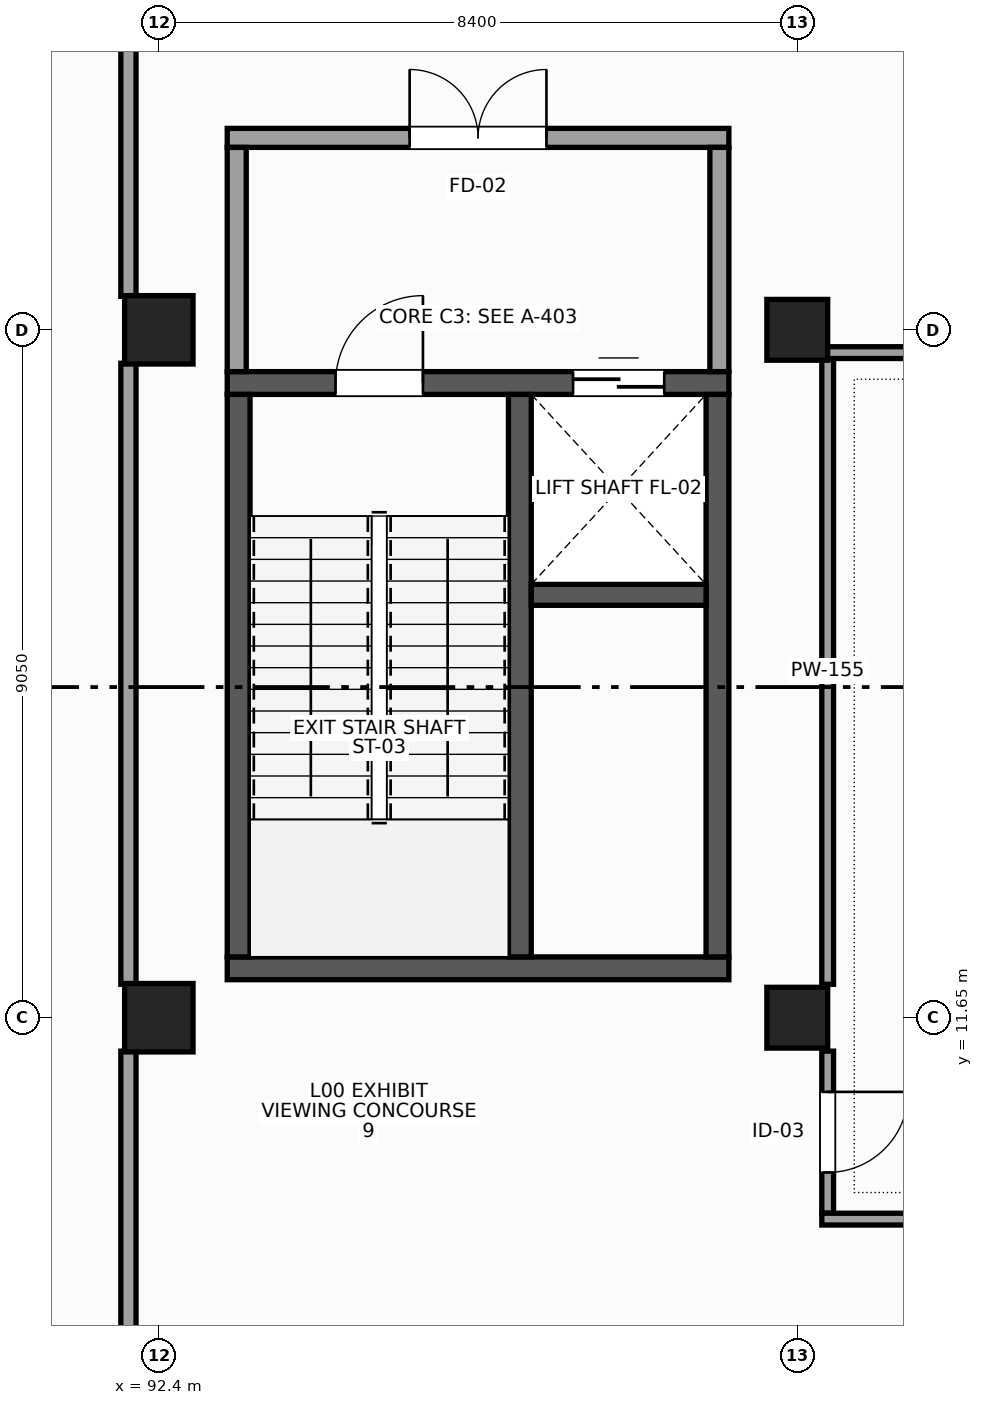
"""IFC4 building model, lengths in metres.
Left out: names, types, materials, properties, quantities, classifications, styles, units other than length and angle.
Written with IfcOpenShell. Run it as: python <this file> out.ifc"""

import sys

from ifc_helpers import new_model, si_unit, direction, frame, frame_2d, origin, origin_2d, place, context, subcontext, project, spatial, rectangle, extrude, element, fill, save


model = new_model("IFC4")
c1 = context("Model", 3, precision=1e-05, world=origin(), true_north=direction((0.0, 1.0)))
c2 = subcontext(c1, "Body", "Model", "MODEL_VIEW")
j1 = project(units=[si_unit("LENGTHUNIT", "METRE"), si_unit("PLANEANGLEUNIT", "RADIAN")], contexts=[c1])
p1 = place(None, origin())
s1 = spatial("IfcSite", under=j1, at=p1, CompositionType="ELEMENT")
p2 = place(p1, origin())
s2 = spatial("IfcBuilding", under=s1, at=p2, CompositionType="ELEMENT")
p3 = place(p2, origin())
s3 = spatial("IfcBuildingStorey", under=s2, at=p3, CompositionType="ELEMENT", Elevation=0.0)
for number, where, z_axis, x_axis in (
    (1, (92.4, 11.65, 0.0), (0.0, 0.0, 1.0), (1.0, 0.0, 0.0)),
    (2, (92.4, 20.7, 0.0), (0.0, 0.0, 1.0), (1.0, 0.0, 0.0)),
):
    element("IfcColumn", number, at=place(p3, frame(where, z_axis=z_axis, x_axis=x_axis)), inside=s3, PredefinedType="COLUMN", context=c2, shape_type="SweptSolid", body=[
        extrude(rectangle(XDim=0.9, YDim=0.9, at=origin_2d()), origin(), (0.0, 0.0, 1.0), 5.4),
    ])
for number, where, z_axis, x_axis in (
    (3, (100.8, 11.65, 0.0), (0.0, 0.0, 1.0), (1.0, 0.0, 0.0)),
    (4, (100.8, 20.7, 0.0), (0.0, 0.0, 1.0), (1.0, 0.0, 0.0)),
):
    element("IfcColumn", number, at=place(p3, frame(where, z_axis=z_axis, x_axis=x_axis)), inside=s3, PredefinedType="COLUMN", context=c2, shape_type="SweptSolid", body=[
        extrude(rectangle(XDim=0.8, YDim=0.8, at=origin_2d()), origin(), (0.0, 0.0, 1.0), 5.4),
    ])
p4 = place(p3, frame((93.3, 12.3, 0.0), z_axis=(0.0, 0.0, 1.0), x_axis=(1.0, 0.0, 0.0)))
e5 = element("IfcWall", 5, at=p4, inside=s3, PredefinedType="SHEAR", context=c2, shape_type="SweptSolid", body=[
    extrude(rectangle(XDim=6.6, YDim=0.3, at=frame_2d((3.3, 0.0))), origin(), (0.0, 0.0, 1.0), 5.09),
])
p5 = place(p3, frame((93.3, 20.0, 0.0), z_axis=(0.0, 0.0, 1.0), x_axis=(1.0, 0.0, 0.0)))
e6 = element("IfcWall", 6, at=p5, inside=s3, PredefinedType="SHEAR", context=c2, shape_type="SweptSolid", body=[
    extrude(rectangle(XDim=6.6, YDim=0.3, at=frame_2d((3.3, 0.0))), origin(), (0.0, 0.0, 1.0), 5.09),
])
p6 = place(p5, frame((1.425, 0.0, 0.0)))
e7 = element("IfcOpeningElement", 7, at=p6, cuts=e6, PredefinedType="OPENING", context=c2, shape_type="SweptSolid", body=[
    extrude(rectangle(XDim=1.15, YDim=2.2, at=frame_2d((0.575, 1.1))), frame((0.0, 0.16, 0.0), z_axis=(0.0, -1.0, 0.0), x_axis=(1.0, 0.0, 0.0)), (0.0, 0.0, 1.0), 0.32),
])
p7 = place(p5, frame((4.55, 0.0, 0.0)))
e8 = element("IfcOpeningElement", 8, at=p7, cuts=e6, PredefinedType="OPENING", context=c2, shape_type="SweptSolid", body=[
    extrude(rectangle(XDim=1.2, YDim=2.15, at=frame_2d((0.6, 1.075))), frame((0.0, 0.16, 0.0), z_axis=(0.0, -1.0, 0.0), x_axis=(1.0, 0.0, 0.0)), (0.0, 0.0, 1.0), 0.32),
])
for number, where, z_axis, x_axis in (
    (9, (93.45, 12.45, 0.0), (0.0, 0.0, 1.0), (0.0, 1.0, 0.0)),
    (10, (99.75, 12.45, 0.0), (0.0, 0.0, 1.0), (0.0, 1.0, 0.0)),
    (11, (97.15, 12.45, 0.0), (0.0, 0.0, 1.0), (0.0, 1.0, 0.0)),
):
    element("IfcWall", number, at=place(p3, frame(where, z_axis=z_axis, x_axis=x_axis)), inside=s3, PredefinedType="SHEAR", context=c2, shape_type="SweptSolid", body=[
        extrude(rectangle(XDim=7.4, YDim=0.3, at=frame_2d((3.7, 0.0))), origin(), (0.0, 0.0, 1.0), 5.09),
    ])
p8 = place(p3, frame((97.3, 17.213, 0.0), z_axis=(0.0, 0.0, 1.0), x_axis=(1.0, 0.0, 0.0)))
e12 = element("IfcWall", 12, at=p8, inside=s3, PredefinedType="SHEAR", context=c2, shape_type="SweptSolid", body=[
    extrude(rectangle(XDim=2.3, YDim=0.275, at=frame_2d((1.15, 0.0))), origin(), (0.0, 0.0, 1.0), 5.09),
])
p9 = place(p3, frame((93.3, 23.225, 0.0), z_axis=(0.0, 0.0, 1.0), x_axis=(1.0, 0.0, 0.0)))
e13 = element("IfcWall", 13, at=p9, inside=s3, PredefinedType="PARTITIONING", context=c2, shape_type="SweptSolid", body=[
    extrude(rectangle(XDim=6.6, YDim=0.25, at=frame_2d((3.3, 0.0))), origin(), (0.0, 0.0, 1.0), 5.09),
])
p10 = place(p9, frame((2.4, 0.0, 0.0)))
e14 = element("IfcOpeningElement", 14, at=p10, cuts=e13, PredefinedType="OPENING", context=c2, shape_type="SweptSolid", body=[
    extrude(rectangle(XDim=1.8, YDim=2.25, at=frame_2d((0.9, 1.125))), frame((0.0, 0.135, 0.0), z_axis=(0.0, -1.0, 0.0), x_axis=(1.0, 0.0, 0.0)), (0.0, 0.0, 1.0), 0.27),
])
for number, where, z_axis, x_axis in (
    (15, (93.425, 20.15, 0.0), (0.0, 0.0, 1.0), (0.0, 1.0, 0.0)),
    (16, (99.775, 20.15, 0.0), (0.0, 0.0, 1.0), (0.0, 1.0, 0.0)),
):
    element("IfcWall", number, at=place(p3, frame(where, z_axis=z_axis, x_axis=x_axis)), inside=s3, PredefinedType="PARTITIONING", context=c2, shape_type="SweptSolid", body=[
        extrude(rectangle(XDim=2.95, YDim=0.25, at=frame_2d((1.475, 0.0))), origin(), (0.0, 0.0, 1.0), 4.23),
    ])
p11 = place(p3, frame((92.0, 2.9, 0.0), z_axis=(0.0, 0.0, 1.0), x_axis=(0.0, 1.0, 0.0)))
e17 = element("IfcWall", 17, at=p11, inside=s3, PredefinedType="PARTITIONING", context=c2, shape_type="SweptSolid", body=[
    extrude(rectangle(XDim=8.31, YDim=0.2, at=frame_2d((4.155, 0.0))), origin(), (0.0, 0.0, 1.0), 3.65),
])
p12 = place(p3, frame((92.0, 12.09, 0.0), z_axis=(0.0, 0.0, 1.0), x_axis=(0.0, 1.0, 0.0)))
e18 = element("IfcWall", 18, at=p12, inside=s3, PredefinedType="PARTITIONING", context=c2, shape_type="SweptSolid", body=[
    extrude(rectangle(XDim=8.17, YDim=0.2, at=frame_2d((4.085, 0.0))), origin(), (0.0, 0.0, 1.0), 4.54),
])
p13 = place(p3, frame((92.0, 21.14, 0.0), z_axis=(0.0, 0.0, 1.0), x_axis=(0.0, 1.0, 0.0)))
e19 = element("IfcWall", 19, at=p13, inside=s3, PredefinedType="PARTITIONING", context=c2, shape_type="SweptSolid", body=[
    extrude(rectangle(XDim=3.26, YDim=0.2, at=frame_2d((1.63, 0.0))), origin(), (0.0, 0.0, 1.0), 4.54),
])
p14 = place(p3, frame((101.2, 9.078, 0.0), z_axis=(0.0, 0.0, 1.0), x_axis=(0.0, 1.0, 0.0)))
e20 = element("IfcWall", 20, at=p14, inside=s3, PredefinedType="PARTITIONING", context=c2, shape_type="SweptSolid", body=[
    extrude(rectangle(XDim=2.132, YDim=0.155, at=frame_2d((1.066, 0.0))), origin(), (0.0, 0.0, 1.0), 5.09),
])
p15 = place(p14, frame((0.536, 0.0, 0.0)))
e21 = element("IfcOpeningElement", 21, at=p15, cuts=e20, PredefinedType="OPENING", context=c2, shape_type="SweptSolid", body=[
    extrude(rectangle(XDim=1.06, YDim=2.15, at=frame_2d((0.53, 1.075))), frame((0.0, 0.087, 0.0), z_axis=(0.0, -1.0, 0.0), x_axis=(1.0, 0.0, 0.0)), (0.0, 0.0, 1.0), 0.175),
])
p16 = place(p3, frame((101.2, 12.09, 0.0), z_axis=(0.0, 0.0, 1.0), x_axis=(0.0, 1.0, 0.0)))
e22 = element("IfcWall", 22, at=p16, inside=s3, PredefinedType="PARTITIONING", context=c2, shape_type="SweptSolid", body=[
    extrude(rectangle(XDim=8.232, YDim=0.155, at=frame_2d((4.116, 0.0))), origin(), (0.0, 0.0, 1.0), 4.54),
])
p17 = place(p3, frame((101.123, 20.4, 0.0), z_axis=(0.0, 0.0, 1.0), x_axis=(1.0, 0.0, 0.0)))
e23 = element("IfcWall", 23, at=p17, inside=s3, PredefinedType="PARTITIONING", context=c2, shape_type="SweptSolid", body=[
    extrude(rectangle(XDim=7.754, YDim=0.155, at=frame_2d((3.877, 0.0))), origin(), (0.0, 0.0, 1.0), 4.13),
])
p18 = place(p3, frame((101.123, 9.0, 0.0), z_axis=(0.0, 0.0, 1.0), x_axis=(1.0, 0.0, 0.0)))
e24 = element("IfcWall", 24, at=p18, inside=s3, PredefinedType="PARTITIONING", context=c2, shape_type="SweptSolid", body=[
    extrude(rectangle(XDim=7.754, YDim=0.155, at=frame_2d((3.877, 0.0))), origin(), (0.0, 0.0, 1.0), 4.14),
])
p19 = place(p6, origin())
e25 = element("IfcDoor", 25, at=p19, inside=s3, OperationType="SINGLE_SWING_RIGHT", PredefinedType="DOOR", context=c2, shape_type="SweptSolid", body=[
    extrude(rectangle(XDim=1.15, YDim=2.2, at=frame_2d((0.575, 1.1))), frame((0.0, 0.025, 0.0), z_axis=(0.0, -1.0, 0.0), x_axis=(1.0, 0.0, 0.0)), (0.0, 0.0, 1.0), 0.05),
])
fill(e7, e25)
p20 = place(p7, origin())
e26 = element("IfcDoor", 26, at=p20, inside=s3, OperationType="DOUBLE_DOOR_SLIDING", PredefinedType="DOOR", context=c2, shape_type="SweptSolid", body=[
    extrude(rectangle(XDim=1.2, YDim=2.15, at=frame_2d((0.6, 1.075))), frame((0.0, 0.025, 0.0), z_axis=(0.0, -1.0, 0.0), x_axis=(1.0, 0.0, 0.0)), (0.0, 0.0, 1.0), 0.05),
])
fill(e8, e26)
p21 = place(p10, origin())
e27 = element("IfcDoor", 27, at=p21, inside=s3, OperationType="DOUBLE_DOOR_SINGLE_SWING", PredefinedType="DOOR", context=c2, shape_type="SweptSolid", body=[
    extrude(rectangle(XDim=1.8, YDim=2.25, at=frame_2d((0.9, 1.125))), frame((0.0, 0.025, 0.0), z_axis=(0.0, -1.0, 0.0), x_axis=(1.0, 0.0, 0.0)), (0.0, 0.0, 1.0), 0.05),
])
fill(e14, e27)
p22 = place(p15, frame((1.06, 0.0, 0.0), z_axis=(0.0, 0.0, 1.0), x_axis=(-1.0, 0.0, 0.0)))
e28 = element("IfcDoor", 28, at=p22, inside=s3, OperationType="SINGLE_SWING_LEFT", PredefinedType="DOOR", context=c2, shape_type="SweptSolid", body=[
    extrude(rectangle(XDim=1.06, YDim=2.15, at=frame_2d((0.53, 1.075))), frame((0.0, 0.025, 0.0), z_axis=(0.0, -1.0, 0.0), x_axis=(1.0, 0.0, 0.0)), (0.0, 0.0, 1.0), 0.05),
])
fill(e21, e28)
save(model, sys.argv[1])
